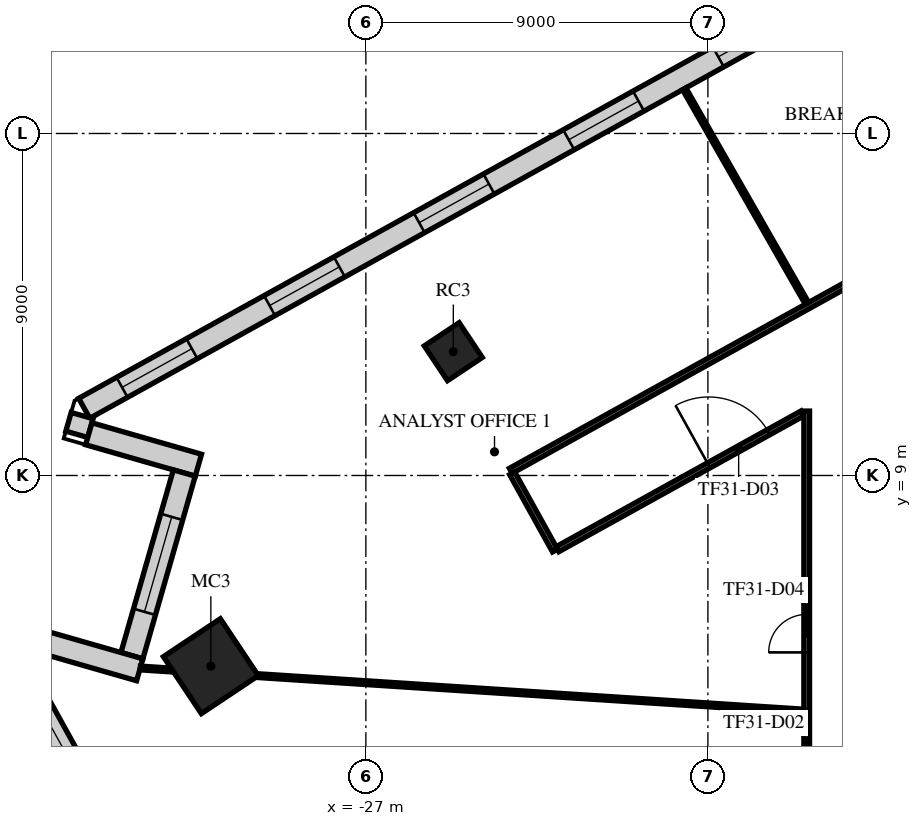
"""IFC4 building model, lengths in metres.
Left out: names, types, materials, properties, quantities, classifications, styles, units other than length and angle.
Written with IfcOpenShell. Run it as: python <this file> out.ifc"""

import sys

from ifc_helpers import new_model, si_unit, direction, frame, frame_2d, origin, origin_2d, place, context, subcontext, project, spatial, rectangle, extrude, element, fill, save


model = new_model("IFC4")
c1 = context("Model", 3, precision=1e-05, world=origin(), true_north=direction((0.0, 1.0)))
c2 = subcontext(c1, "Body", "Model", "MODEL_VIEW")
j1 = project(units=[si_unit("LENGTHUNIT", "METRE"), si_unit("PLANEANGLEUNIT", "RADIAN")], contexts=[c1])
p1 = place(None, origin())
s1 = spatial("IfcSite", under=j1, at=p1, CompositionType="ELEMENT")
p2 = place(p1, origin())
s2 = spatial("IfcBuilding", under=s1, at=p2, CompositionType="ELEMENT")
p3 = place(p2, frame((0.0, 0.0, 139.7)))
s3 = spatial("IfcBuildingStorey", under=s2, at=p3, CompositionType="ELEMENT", Elevation=139.7)
p4 = place(p3, frame((-24.699, 12.258, 0.0), z_axis=(0.0, 0.0, 1.0), x_axis=(0.832028680356, 0.55473261583, 0.0)))
e1 = element("IfcColumn", 1, at=p4, inside=s3, PredefinedType="COLUMN", context=c2, shape_type="SweptSolid", body=[
    extrude(rectangle(XDim=1.1, YDim=1.1, at=origin_2d()), origin(), (0.0, 0.0, 1.0), 4.0),
])
p5 = place(p3, frame((-31.079, 3.982, 0.0), z_axis=(0.0, 0.0, 1.0), x_axis=(0.832028680356, 0.55473261583, 0.0)))
e2 = element("IfcColumn", 2, at=p5, inside=s3, PredefinedType="COLUMN", context=c2, shape_type="SweptSolid", body=[
    extrude(rectangle(XDim=1.8, YDim=1.8, at=origin_2d()), origin(), (0.0, 0.0, 1.0), 4.0),
])
p6 = place(p3, frame((8.775, 34.705, 0.0), z_axis=(0.0, 0.0, 1.0), x_axis=(-0.874620778241, -0.484807687922, 0.0)))
e3 = element("IfcWall", 3, at=p6, inside=s3, PredefinedType="STANDARD", context=c2, shape_type="SweptSolid", body=[
    extrude(rectangle(XDim=49.376, YDim=0.6, at=frame_2d((24.688, 0.0))), origin(), (0.0, 0.0, 1.0), 3.6),
])
p7 = place(p6, frame((1.2, 0.0, 0.9)))
e4 = element("IfcOpeningElement", 4, at=p7, cuts=e3, PredefinedType="OPENING", context=c2, shape_type="SweptSolid", body=[
    extrude(rectangle(XDim=2.1, YDim=2.1, at=frame_2d((1.05, 1.05))), frame((0.0, 0.31, 0.0), z_axis=(0.0, -1.0, 0.0), x_axis=(1.0, 0.0, 0.0)), (0.0, 0.0, 1.0), 0.62),
])
p8 = place(p6, frame((5.7, 0.0, 0.9)))
e5 = element("IfcOpeningElement", 5, at=p8, cuts=e3, PredefinedType="OPENING", context=c2, shape_type="SweptSolid", body=[
    extrude(rectangle(XDim=2.1, YDim=2.1, at=frame_2d((1.05, 1.05))), frame((0.0, 0.31, 0.0), z_axis=(0.0, -1.0, 0.0), x_axis=(1.0, 0.0, 0.0)), (0.0, 0.0, 1.0), 0.62),
])
p9 = place(p6, frame((14.7, 0.0, 0.9)))
e6 = element("IfcOpeningElement", 6, at=p9, cuts=e3, PredefinedType="OPENING", context=c2, shape_type="SweptSolid", body=[
    extrude(rectangle(XDim=2.1, YDim=2.1, at=frame_2d((1.05, 1.05))), frame((0.0, 0.31, 0.0), z_axis=(0.0, -1.0, 0.0), x_axis=(1.0, 0.0, 0.0)), (0.0, 0.0, 1.0), 0.62),
])
p10 = place(p6, frame((19.2, 0.0, 0.9)))
e7 = element("IfcOpeningElement", 7, at=p10, cuts=e3, PredefinedType="OPENING", context=c2, shape_type="SweptSolid", body=[
    extrude(rectangle(XDim=2.1, YDim=2.1, at=frame_2d((1.05, 1.05))), frame((0.0, 0.31, 0.0), z_axis=(0.0, -1.0, 0.0), x_axis=(1.0, 0.0, 0.0)), (0.0, 0.0, 1.0), 0.62),
])
p11 = place(p6, frame((23.7, 0.0, 0.9)))
e8 = element("IfcOpeningElement", 8, at=p11, cuts=e3, PredefinedType="OPENING", context=c2, shape_type="SweptSolid", body=[
    extrude(rectangle(XDim=2.1, YDim=2.1, at=frame_2d((1.05, 1.05))), frame((0.0, 0.31, 0.0), z_axis=(0.0, -1.0, 0.0), x_axis=(1.0, 0.0, 0.0)), (0.0, 0.0, 1.0), 0.62),
])
p12 = place(p6, frame((28.2, 0.0, 0.9)))
e9 = element("IfcOpeningElement", 9, at=p12, cuts=e3, PredefinedType="OPENING", context=c2, shape_type="SweptSolid", body=[
    extrude(rectangle(XDim=2.1, YDim=2.1, at=frame_2d((1.05, 1.05))), frame((0.0, 0.31, 0.0), z_axis=(0.0, -1.0, 0.0), x_axis=(1.0, 0.0, 0.0)), (0.0, 0.0, 1.0), 0.62),
])
p13 = place(p6, frame((32.7, 0.0, 0.9)))
e10 = element("IfcOpeningElement", 10, at=p13, cuts=e3, PredefinedType="OPENING", context=c2, shape_type="SweptSolid", body=[
    extrude(rectangle(XDim=2.1, YDim=2.1, at=frame_2d((1.05, 1.05))), frame((0.0, 0.31, 0.0), z_axis=(0.0, -1.0, 0.0), x_axis=(1.0, 0.0, 0.0)), (0.0, 0.0, 1.0), 0.62),
])
p14 = place(p6, frame((37.2, 0.0, 0.9)))
e11 = element("IfcOpeningElement", 11, at=p14, cuts=e3, PredefinedType="OPENING", context=c2, shape_type="SweptSolid", body=[
    extrude(rectangle(XDim=2.1, YDim=2.1, at=frame_2d((1.05, 1.05))), frame((0.0, 0.31, 0.0), z_axis=(0.0, -1.0, 0.0), x_axis=(1.0, 0.0, 0.0)), (0.0, 0.0, 1.0), 0.62),
])
p15 = place(p6, frame((41.7, 0.0, 0.9)))
e12 = element("IfcOpeningElement", 12, at=p15, cuts=e3, PredefinedType="OPENING", context=c2, shape_type="SweptSolid", body=[
    extrude(rectangle(XDim=2.1, YDim=2.1, at=frame_2d((1.05, 1.05))), frame((0.0, 0.31, 0.0), z_axis=(0.0, -1.0, 0.0), x_axis=(1.0, 0.0, 0.0)), (0.0, 0.0, 1.0), 0.62),
])
p16 = place(p6, frame((46.138, 0.0, 0.9)))
e13 = element("IfcOpeningElement", 13, at=p16, cuts=e3, PredefinedType="OPENING", context=c2, shape_type="SweptSolid", body=[
    extrude(rectangle(XDim=2.1, YDim=2.1, at=frame_2d((1.05, 1.05))), frame((0.0, 0.31, 0.0), z_axis=(0.0, -1.0, 0.0), x_axis=(1.0, 0.0, 0.0)), (0.0, 0.0, 1.0), 0.62),
])
p17 = place(p3, frame((-34.466, 10.575, 0.0), z_axis=(0.0, 0.0, 1.0), x_axis=(-0.275667500387, -0.96125305161, 0.0)))
e14 = element("IfcWall", 14, at=p17, inside=s3, PredefinedType="STANDARD", context=c2, shape_type="SweptSolid", body=[
    extrude(rectangle(XDim=0.511, YDim=0.6, at=frame_2d((0.255, 0.0))), origin(), (0.0, 0.0, 1.0), 3.6),
])
p18 = place(p3, frame((-34.291, 10.097, 0.0), z_axis=(0.0, 0.0, 1.0), x_axis=(0.96126248289, -0.275634611374, 0.0)))
e15 = element("IfcWall", 15, at=p18, inside=s3, PredefinedType="STANDARD", context=c2, shape_type="SweptSolid", body=[
    extrude(rectangle(XDim=3.0, YDim=0.6, at=frame_2d((1.5, 0.0))), origin(), (0.0, 0.0, 1.0), 3.6),
])
p19 = place(p3, frame((-31.778, 9.065, 0.0), z_axis=(0.0, 0.0, 1.0), x_axis=(-0.275675415896, -0.961250781571, 0.0)))
e16 = element("IfcWall", 16, at=p19, inside=s3, PredefinedType="STANDARD", context=c2, shape_type="SweptSolid", body=[
    extrude(rectangle(XDim=5.0, YDim=0.6, at=frame_2d((2.5, 0.0))), origin(), (0.0, 0.0, 1.0), 3.6),
])
p20 = place(p19, frame((1.2, 0.0, 0.9)))
e17 = element("IfcOpeningElement", 17, at=p20, cuts=e16, PredefinedType="OPENING", context=c2, shape_type="SweptSolid", body=[
    extrude(rectangle(XDim=2.6, YDim=2.1, at=frame_2d((1.3, 1.05))), frame((0.0, 0.31, 0.0), z_axis=(0.0, -1.0, 0.0), x_axis=(1.0, 0.0, 0.0)), (0.0, 0.0, 1.0), 0.62),
])
p21 = place(p3, frame((-32.95, 3.887, 0.0), z_axis=(0.0, 0.0, 1.0), x_axis=(-0.96126248289, 0.275634611374, 0.0)))
e18 = element("IfcWall", 18, at=p21, inside=s3, PredefinedType="STANDARD", context=c2, shape_type="SweptSolid", body=[
    extrude(rectangle(XDim=3.0, YDim=0.6, at=frame_2d((1.5, 0.0))), origin(), (0.0, 0.0, 1.0), 3.6),
])
p22 = place(p3, frame((-36.291, 4.209, 0.0), z_axis=(0.0, 0.0, 1.0), x_axis=(0.484810659622, -0.874619131003, 0.0)))
e19 = element("IfcWall", 19, at=p22, inside=s3, PredefinedType="STANDARD", context=c2, shape_type="SweptSolid", body=[
    extrude(rectangle(XDim=42.552, YDim=0.6, at=frame_2d((21.276, 0.0))), origin(), (0.0, 0.0, 1.0), 3.6),
])
p23 = place(p22, frame((1.178, 0.0, 0.9)))
e20 = element("IfcOpeningElement", 20, at=p23, cuts=e19, PredefinedType="OPENING", context=c2, shape_type="SweptSolid", body=[
    extrude(rectangle(XDim=1.8, YDim=2.1, at=frame_2d((0.9, 1.05))), frame((0.0, 0.31, 0.0), z_axis=(0.0, -1.0, 0.0), x_axis=(1.0, 0.0, 0.0)), (0.0, 0.0, 1.0), 0.62),
])
p24 = place(p22, frame((5.396, 0.0, 0.9)))
e21 = element("IfcOpeningElement", 21, at=p24, cuts=e19, PredefinedType="OPENING", context=c2, shape_type="SweptSolid", body=[
    extrude(rectangle(XDim=1.8, YDim=2.1, at=frame_2d((0.9, 1.05))), frame((0.0, 0.31, 0.0), z_axis=(0.0, -1.0, 0.0), x_axis=(1.0, 0.0, 0.0)), (0.0, 0.0, 1.0), 0.62),
])
p25 = place(p22, frame((13.956, 0.0, 0.9)))
e22 = element("IfcOpeningElement", 22, at=p25, cuts=e19, PredefinedType="OPENING", context=c2, shape_type="SweptSolid", body=[
    extrude(rectangle(XDim=1.8, YDim=2.1, at=frame_2d((0.9, 1.05))), frame((0.0, 0.31, 0.0), z_axis=(0.0, -1.0, 0.0), x_axis=(1.0, 0.0, 0.0)), (0.0, 0.0, 1.0), 0.62),
])
p26 = place(p22, frame((18.236, 0.0, 0.9)))
e23 = element("IfcOpeningElement", 23, at=p26, cuts=e19, PredefinedType="OPENING", context=c2, shape_type="SweptSolid", body=[
    extrude(rectangle(XDim=1.8, YDim=2.1, at=frame_2d((0.9, 1.05))), frame((0.0, 0.31, 0.0), z_axis=(0.0, -1.0, 0.0), x_axis=(1.0, 0.0, 0.0)), (0.0, 0.0, 1.0), 0.62),
])
p27 = place(p22, frame((22.516, 0.0, 0.9)))
e24 = element("IfcOpeningElement", 24, at=p27, cuts=e19, PredefinedType="OPENING", context=c2, shape_type="SweptSolid", body=[
    extrude(rectangle(XDim=1.8, YDim=2.1, at=frame_2d((0.9, 1.05))), frame((0.0, 0.31, 0.0), z_axis=(0.0, -1.0, 0.0), x_axis=(1.0, 0.0, 0.0)), (0.0, 0.0, 1.0), 0.62),
])
p28 = place(p22, frame((26.796, 0.0, 0.9)))
e25 = element("IfcOpeningElement", 25, at=p28, cuts=e19, PredefinedType="OPENING", context=c2, shape_type="SweptSolid", body=[
    extrude(rectangle(XDim=1.8, YDim=2.1, at=frame_2d((0.9, 1.05))), frame((0.0, 0.31, 0.0), z_axis=(0.0, -1.0, 0.0), x_axis=(1.0, 0.0, 0.0)), (0.0, 0.0, 1.0), 0.62),
])
p29 = place(p22, frame((31.076, 0.0, 0.9)))
e26 = element("IfcOpeningElement", 26, at=p29, cuts=e19, PredefinedType="OPENING", context=c2, shape_type="SweptSolid", body=[
    extrude(rectangle(XDim=1.8, YDim=2.1, at=frame_2d((0.9, 1.05))), frame((0.0, 0.31, 0.0), z_axis=(0.0, -1.0, 0.0), x_axis=(1.0, 0.0, 0.0)), (0.0, 0.0, 1.0), 0.62),
])
p30 = place(p22, frame((35.356, 0.0, 0.9)))
e27 = element("IfcOpeningElement", 27, at=p30, cuts=e19, PredefinedType="OPENING", context=c2, shape_type="SweptSolid", body=[
    extrude(rectangle(XDim=1.8, YDim=2.1, at=frame_2d((0.9, 1.05))), frame((0.0, 0.31, 0.0), z_axis=(0.0, -1.0, 0.0), x_axis=(1.0, 0.0, 0.0)), (0.0, 0.0, 1.0), 0.62),
])
p31 = place(p22, frame((39.573, 0.0, 0.9)))
e28 = element("IfcOpeningElement", 28, at=p31, cuts=e19, PredefinedType="OPENING", context=c2, shape_type="SweptSolid", body=[
    extrude(rectangle(XDim=1.8, YDim=2.1, at=frame_2d((0.9, 1.05))), frame((0.0, 0.31, 0.0), z_axis=(0.0, -1.0, 0.0), x_axis=(1.0, 0.0, 0.0)), (0.0, 0.0, 1.0), 0.62),
])
p32 = place(p3, frame((-23.187, 9.123, 0.0), z_axis=(0.0, 0.0, 1.0), x_axis=(0.874618419846, 0.484811942578, 0.0)))
e29 = element("IfcWall", 29, at=p32, inside=s3, PredefinedType="PARTITIONING", context=c2, shape_type="SweptSolid", body=[
    extrude(rectangle(XDim=31.713, YDim=0.15, at=frame_2d((15.857, 0.0))), origin(), (0.0, 0.0, 1.0), 3.15),
])
p33 = place(p32, frame((11.252, 0.0, 0.0)))
e30 = element("IfcOpeningElement", 30, at=p33, cuts=e29, PredefinedType="OPENING", context=c2, shape_type="SweptSolid", body=[
    extrude(rectangle(XDim=1.0, YDim=2.1, at=frame_2d((0.5, 1.05))), frame((0.0, 0.085, 0.0), z_axis=(0.0, -1.0, 0.0), x_axis=(1.0, 0.0, 0.0)), (0.0, 0.0, 1.0), 0.17),
])
p34 = place(p32, frame((19.896, 0.0, 0.0)))
e31 = element("IfcOpeningElement", 31, at=p34, cuts=e29, PredefinedType="OPENING", context=c2, shape_type="SweptSolid", body=[
    extrude(rectangle(XDim=1.0, YDim=2.1, at=frame_2d((0.5, 1.05))), frame((0.0, 0.085, 0.0), z_axis=(0.0, -1.0, 0.0), x_axis=(1.0, 0.0, 0.0)), (0.0, 0.0, 1.0), 0.17),
])
p35 = place(p32, frame((29.223, 0.0, 0.0)))
e32 = element("IfcOpeningElement", 32, at=p35, cuts=e29, PredefinedType="OPENING", context=c2, shape_type="SweptSolid", body=[
    extrude(rectangle(XDim=1.0, YDim=2.1, at=frame_2d((0.5, 1.05))), frame((0.0, 0.085, 0.0), z_axis=(0.0, -1.0, 0.0), x_axis=(1.0, 0.0, 0.0)), (0.0, 0.0, 1.0), 0.17),
])
p36 = place(p3, frame((-23.151, 9.057, 0.0), z_axis=(0.0, 0.0, 1.0), x_axis=(0.484983092102, -0.874523527628, 0.0)))
e33 = element("IfcWall", 33, at=p36, inside=s3, PredefinedType="PARTITIONING", context=c2, shape_type="SweptSolid", body=[
    extrude(rectangle(XDim=2.325, YDim=0.15, at=frame_2d((1.163, 0.0))), origin(), (0.0, 0.0, 1.0), 3.15),
])
p37 = place(p3, frame((-21.958, 7.06, 0.0), z_axis=(0.0, 0.0, 1.0), x_axis=(0.87462563297, 0.484798929611, 0.0)))
e34 = element("IfcWall", 34, at=p37, inside=s3, PredefinedType="PARTITIONING", context=c2, shape_type="SweptSolid", body=[
    extrude(rectangle(XDim=7.37, YDim=0.15, at=frame_2d((3.685, 0.0))), origin(), (0.0, 0.0, 1.0), 3.15),
])
p38 = place(p37, frame((4.55, 0.0, 0.0)))
e35 = element("IfcOpeningElement", 35, at=p38, cuts=e34, PredefinedType="OPENING", context=c2, shape_type="SweptSolid", body=[
    extrude(rectangle(XDim=1.8, YDim=2.1, at=frame_2d((0.9, 1.05))), frame((0.0, 0.085, 0.0), z_axis=(0.0, -1.0, 0.0), x_axis=(1.0, 0.0, 0.0)), (0.0, 0.0, 1.0), 0.17),
])
p39 = place(p3, frame((-15.4, -3.201, 0.0), z_axis=(0.0, 0.0, 1.0), x_axis=(0.0, 1.0, 0.0)))
e36 = element("IfcWall", 36, at=p39, inside=s3, PredefinedType="PARTITIONING", context=c2, shape_type="SweptSolid", body=[
    extrude(rectangle(XDim=13.896, YDim=0.15, at=frame_2d((6.948, 0.0))), origin(), (0.0, 0.0, 1.0), 3.15),
])
p40 = place(p39, frame((4.05, 0.0, 0.0)))
e37 = element("IfcOpeningElement", 37, at=p40, cuts=e36, PredefinedType="OPENING", context=c2, shape_type="SweptSolid", body=[
    extrude(rectangle(XDim=1.0, YDim=2.1, at=frame_2d((0.5, 1.05))), frame((0.0, 0.085, 0.0), z_axis=(0.0, -1.0, 0.0), x_axis=(1.0, 0.0, 0.0)), (0.0, 0.0, 1.0), 0.17),
])
p41 = place(p39, frame((7.546, 0.0, 0.0)))
e38 = element("IfcOpeningElement", 38, at=p41, cuts=e36, PredefinedType="OPENING", context=c2, shape_type="SweptSolid", body=[
    extrude(rectangle(XDim=1.0, YDim=2.1, at=frame_2d((0.5, 1.05))), frame((0.0, 0.085, 0.0), z_axis=(0.0, -1.0, 0.0), x_axis=(1.0, 0.0, 0.0)), (0.0, 0.0, 1.0), 0.17),
])
p42 = place(p3, frame((-32.935, 3.934, 0.0), z_axis=(0.0, 0.0, 1.0), x_axis=(0.997900062075, -0.064772417822, 0.0)))
e39 = element("IfcWall", 39, at=p42, inside=s3, PredefinedType="PARTITIONING", context=c2, shape_type="SweptSolid", body=[
    extrude(rectangle(XDim=0.844, YDim=0.1, at=frame_2d((0.422, 0.0))), origin(), (0.0, 0.0, 1.0), 3.6),
])
p43 = place(p3, frame((-29.831, 3.732, 0.0), z_axis=(0.0, 0.0, 1.0), x_axis=(0.997896608912, -0.0648255962, 0.0)))
e40 = element("IfcWall", 40, at=p43, inside=s3, PredefinedType="PARTITIONING", context=c2, shape_type="SweptSolid", body=[
    extrude(rectangle(XDim=14.383, YDim=0.1, at=frame_2d((7.191, 0.0))), origin(), (0.0, 0.0, 1.0), 3.03),
])
p44 = place(p3, frame((-18.622, 19.174, 0.0), z_axis=(0.0, 0.0, 1.0), x_axis=(0.496555361039, -0.8680050538, 0.0)))
e41 = element("IfcWall", 41, at=p44, inside=s3, PredefinedType="PARTITIONING", context=c2, shape_type="SweptSolid", body=[
    extrude(rectangle(XDim=6.502, YDim=0.1, at=frame_2d((3.251, 0.0))), origin(), (0.0, 0.0, 1.0), 3.15),
])
p45 = place(p12, origin())
e42 = element("IfcWindow", 42, at=p45, inside=s3, PartitioningType="SINGLE_PANEL", PredefinedType="WINDOW", context=c2, shape_type="SweptSolid", body=[
    extrude(rectangle(XDim=2.1, YDim=2.1, at=frame_2d((1.05, 1.05))), frame((0.0, 0.03, 0.0), z_axis=(0.0, -1.0, 0.0), x_axis=(1.0, 0.0, 0.0)), (0.0, 0.0, 1.0), 0.06),
])
fill(e9, e42)
p46 = place(p13, origin())
e43 = element("IfcWindow", 43, at=p46, inside=s3, PartitioningType="SINGLE_PANEL", PredefinedType="WINDOW", context=c2, shape_type="SweptSolid", body=[
    extrude(rectangle(XDim=2.1, YDim=2.1, at=frame_2d((1.05, 1.05))), frame((0.0, 0.03, 0.0), z_axis=(0.0, -1.0, 0.0), x_axis=(1.0, 0.0, 0.0)), (0.0, 0.0, 1.0), 0.06),
])
fill(e10, e43)
p47 = place(p14, origin())
e44 = element("IfcWindow", 44, at=p47, inside=s3, PartitioningType="SINGLE_PANEL", PredefinedType="WINDOW", context=c2, shape_type="SweptSolid", body=[
    extrude(rectangle(XDim=2.1, YDim=2.1, at=frame_2d((1.05, 1.05))), frame((0.0, 0.03, 0.0), z_axis=(0.0, -1.0, 0.0), x_axis=(1.0, 0.0, 0.0)), (0.0, 0.0, 1.0), 0.06),
])
fill(e11, e44)
p48 = place(p15, origin())
e45 = element("IfcWindow", 45, at=p48, inside=s3, PartitioningType="SINGLE_PANEL", PredefinedType="WINDOW", context=c2, shape_type="SweptSolid", body=[
    extrude(rectangle(XDim=2.1, YDim=2.1, at=frame_2d((1.05, 1.05))), frame((0.0, 0.03, 0.0), z_axis=(0.0, -1.0, 0.0), x_axis=(1.0, 0.0, 0.0)), (0.0, 0.0, 1.0), 0.06),
])
fill(e12, e45)
p49 = place(p16, origin())
e46 = element("IfcWindow", 46, at=p49, inside=s3, PartitioningType="SINGLE_PANEL", PredefinedType="WINDOW", context=c2, shape_type="SweptSolid", body=[
    extrude(rectangle(XDim=2.1, YDim=2.1, at=frame_2d((1.05, 1.05))), frame((0.0, 0.03, 0.0), z_axis=(0.0, -1.0, 0.0), x_axis=(1.0, 0.0, 0.0)), (0.0, 0.0, 1.0), 0.06),
])
fill(e13, e46)
p50 = place(p20, origin())
e47 = element("IfcWindow", 47, at=p50, inside=s3, PartitioningType="SINGLE_PANEL", PredefinedType="WINDOW", context=c2, shape_type="SweptSolid", body=[
    extrude(rectangle(XDim=2.6, YDim=2.1, at=frame_2d((1.3, 1.05))), frame((0.0, 0.03, 0.0), z_axis=(0.0, -1.0, 0.0), x_axis=(1.0, 0.0, 0.0)), (0.0, 0.0, 1.0), 0.06),
])
fill(e17, e47)
p51 = place(p23, origin())
e48 = element("IfcWindow", 48, at=p51, inside=s3, PartitioningType="SINGLE_PANEL", PredefinedType="WINDOW", context=c2, shape_type="SweptSolid", body=[
    extrude(rectangle(XDim=1.8, YDim=2.1, at=frame_2d((0.9, 1.05))), frame((0.0, 0.03, 0.0), z_axis=(0.0, -1.0, 0.0), x_axis=(1.0, 0.0, 0.0)), (0.0, 0.0, 1.0), 0.06),
])
fill(e20, e48)
p52 = place(p38, frame((1.8, 0.0, 0.0), z_axis=(0.0, 0.0, 1.0), x_axis=(-1.0, 0.0, 0.0)))
e49 = element("IfcDoor", 49, at=p52, inside=s3, OperationType="DOUBLE_DOOR_SINGLE_SWING", PredefinedType="DOOR", context=c2, shape_type="SweptSolid", body=[
    extrude(rectangle(XDim=1.8, YDim=2.1, at=frame_2d((0.9, 1.05))), frame((0.0, 0.025, 0.0), z_axis=(0.0, -1.0, 0.0), x_axis=(1.0, 0.0, 0.0)), (0.0, 0.0, 1.0), 0.05),
])
fill(e35, e49)
p53 = place(p41, origin())
e50 = element("IfcDoor", 50, at=p53, inside=s3, OperationType="SINGLE_SWING_RIGHT", PredefinedType="DOOR", context=c2, shape_type="SweptSolid", body=[
    extrude(rectangle(XDim=1.0, YDim=2.1, at=frame_2d((0.5, 1.05))), frame((0.0, 0.025, 0.0), z_axis=(0.0, -1.0, 0.0), x_axis=(1.0, 0.0, 0.0)), (0.0, 0.0, 1.0), 0.05),
])
fill(e38, e50)
save(model, sys.argv[1])
